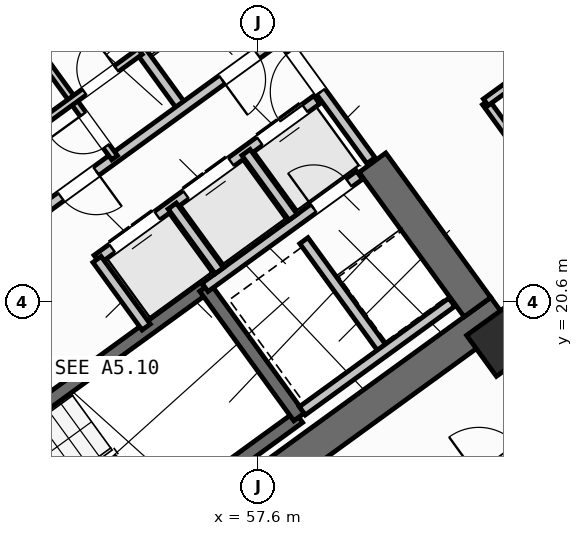
"""IFC4 building model, lengths in metres.
Left out: names, types, materials, properties, quantities, classifications, styles, units other than length and angle.
Written with IfcOpenShell. Run it as: python <this file> out.ifc"""

import sys

from ifc_helpers import new_model, si_unit, direction, frame, frame_2d, origin, origin_2d, place, context, subcontext, project, spatial, rectangle, hollow_rectangle, extrude, source, transform, mapped, element, fill, save


model = new_model("IFC4")
c1 = context("Model", 3, precision=1e-05, world=origin(), true_north=direction((0.0, 1.0)))
c2 = subcontext(c1, "Body", "Model", "MODEL_VIEW")
j1 = project(units=[si_unit("LENGTHUNIT", "METRE"), si_unit("PLANEANGLEUNIT", "RADIAN")], contexts=[c1])
p1 = place(None, origin())
s1 = spatial("IfcSite", under=j1, at=p1, CompositionType="ELEMENT")
p2 = place(p1, origin())
s2 = spatial("IfcBuilding", under=s1, at=p2, CompositionType="ELEMENT")
p3 = place(p2, frame((0.0, 0.0, 63.6)))
s3 = spatial("IfcBuildingStorey", under=s2, at=p3, CompositionType="ELEMENT", Elevation=63.6)
p4 = place(p3, frame((52.318, 13.11, 0.0), z_axis=(0.0, 0.0, 1.0), x_axis=(0.809019445368, 0.587781878776, 0.0)))
e1 = element("IfcWall", 1, at=p4, inside=s3, PredefinedType="SHEAR", context=c2, shape_type="SweptSolid", body=[
    extrude(rectangle(XDim=12.44, YDim=0.65, at=frame_2d((6.22, 0.0))), origin(), (0.0, 0.0, 1.0), 3.35),
])
p5 = place(p3, frame((44.325, 24.113, 0.0), z_axis=(0.0, 0.0, 1.0), x_axis=(0.809012664862, 0.58779121131, 0.0)))
e2 = element("IfcWall", 2, at=p5, inside=s3, PredefinedType="SHEAR", context=c2, shape_type="SweptSolid", body=[
    extrude(rectangle(XDim=12.44, YDim=0.65, at=frame_2d((6.22, 0.0))), origin(), (0.0, 0.0, 1.0), 3.35),
])
p6 = place(p3, frame((61.929, 20.494, 0.0), z_axis=(0.0, 0.0, 1.0), x_axis=(-0.58782982593, 0.808984607855, 0.0)))
e3 = element("IfcWall", 3, at=p6, inside=s3, PredefinedType="SHEAR", context=c2, shape_type="SweptSolid", body=[
    extrude(rectangle(XDim=3.525, YDim=0.65, at=frame_2d((1.762, 0.0))), origin(), (0.0, 0.0, 1.0), 3.35),
])
m1 = source(origin(), c2, "Body", "SweptSolid", [
    extrude(hollow_rectangle(XDim=1.0, YDim=1.0, WallThickness=0.04, at=origin_2d()), origin(), (0.0, 0.0, 1.0), 3.6),
])
p7 = place(p3, frame((62.414, 19.827, 0.0), z_axis=(0.0, 0.0, 1.0), x_axis=(0.809016994375, 0.587785252292, 0.0)))
e4 = element("IfcColumn", 4, at=p7, inside=s3, PredefinedType="COLUMN", context=c2, shape_type="MappedRepresentation", body=[
    mapped(m1, transform((0.0, 0.0, 0.0), scale=1.0)),
])
p8 = place(p3, frame((43.938, 25.192, 0.0), z_axis=(0.0, 0.0, 1.0), x_axis=(0.809016324578, 0.587786174187, 0.0)))
e5 = element("IfcWall", 5, at=p8, inside=s3, PredefinedType="STANDARD", context=c2, shape_type="SweptSolid", body=[
    extrude(rectangle(XDim=17.587, YDim=0.32, at=frame_2d((8.794, 0.0))), origin(), (0.0, 0.0, 1.0), 3.35),
])
p9 = place(p8, frame((14.914, 0.0, 0.0)))
e6 = element("IfcOpeningElement", 6, at=p9, cuts=e5, PredefinedType="OPENING", context=c2, shape_type="SweptSolid", body=[
    extrude(rectangle(XDim=1.05, YDim=2.15, at=frame_2d((0.525, 1.075))), frame((0.0, 0.17, 0.0), z_axis=(0.0, -1.0, 0.0), x_axis=(1.0, 0.0, 0.0)), (0.0, 0.0, 1.0), 0.34),
])
p10 = place(p8, frame((2.169, 0.0, 0.8)))
e7 = element("IfcOpeningElement", 7, at=p10, cuts=e5, PredefinedType="OPENING", context=c2, shape_type="SweptSolid", body=[
    extrude(rectangle(XDim=2.1, YDim=1.55, at=frame_2d((1.05, 0.775))), frame((0.0, 0.17, 0.0), z_axis=(0.0, -1.0, 0.0), x_axis=(1.0, 0.0, 0.0)), (0.0, 0.0, 1.0), 0.34),
])
p11 = place(p8, frame((7.319, 0.0, 0.8)))
e8 = element("IfcOpeningElement", 8, at=p11, cuts=e5, PredefinedType="OPENING", context=c2, shape_type="SweptSolid", body=[
    extrude(rectangle(XDim=2.1, YDim=1.55, at=frame_2d((1.05, 0.775))), frame((0.0, 0.17, 0.0), z_axis=(0.0, -1.0, 0.0), x_axis=(1.0, 0.0, 0.0)), (0.0, 0.0, 1.0), 0.34),
])
p12 = place(p3, frame((58.455, 35.484, 0.0), z_axis=(0.0, 0.0, 1.0), x_axis=(0.587783625747, -0.809018176127, 0.0)))
e9 = element("IfcWall", 9, at=p12, inside=s3, PredefinedType="STANDARD", context=c2, shape_type="SweptSolid", body=[
    extrude(rectangle(XDim=21.587, YDim=0.32, at=frame_2d((10.794, 0.0))), origin(), (0.0, 0.0, 1.0), 2.725),
])
p13 = place(p12, frame((2.994, 0.0, 0.8)))
e10 = element("IfcOpeningElement", 10, at=p13, cuts=e9, PredefinedType="OPENING", context=c2, shape_type="SweptSolid", body=[
    extrude(rectangle(XDim=2.1, YDim=1.55, at=frame_2d((1.05, 0.775))), frame((0.0, 0.17, 0.0), z_axis=(0.0, -1.0, 0.0), x_axis=(1.0, 0.0, 0.0)), (0.0, 0.0, 1.0), 0.34),
])
p14 = place(p12, frame((11.934, 0.0, 0.85)))
e11 = element("IfcOpeningElement", 11, at=p14, cuts=e9, PredefinedType="OPENING", context=c2, shape_type="SweptSolid", body=[
    extrude(rectangle(XDim=1.8, YDim=1.5, at=frame_2d((0.9, 0.75))), frame((0.0, 0.17, 0.0), z_axis=(0.0, -1.0, 0.0), x_axis=(1.0, 0.0, 0.0)), (0.0, 0.0, 1.0), 0.34),
])
p15 = place(p12, frame((18.535, 0.0, 0.85)))
e12 = element("IfcOpeningElement", 12, at=p15, cuts=e9, PredefinedType="OPENING", context=c2, shape_type="SweptSolid", body=[
    extrude(rectangle(XDim=1.5, YDim=1.5, at=frame_2d((0.75, 0.75))), frame((0.0, 0.17, 0.0), z_axis=(0.0, -1.0, 0.0), x_axis=(1.0, 0.0, 0.0)), (0.0, 0.0, 1.0), 0.34),
])
p16 = place(p3, frame((71.098, 17.731, 0.0), z_axis=(0.0, 0.0, 1.0), x_axis=(-0.809021120468, -0.587779573171, 0.0)))
e13 = element("IfcWall", 13, at=p16, inside=s3, PredefinedType="STANDARD", context=c2, shape_type="SweptSolid", body=[
    extrude(rectangle(XDim=17.588, YDim=0.32, at=frame_2d((8.794, 0.0))), origin(), (0.0, 0.0, 1.0), 3.35),
])
p17 = place(p16, frame((1.624, 0.0, 0.0)))
e14 = element("IfcOpeningElement", 14, at=p17, cuts=e13, PredefinedType="OPENING", context=c2, shape_type="SweptSolid", body=[
    extrude(rectangle(XDim=1.05, YDim=2.15, at=frame_2d((0.525, 1.075))), frame((0.0, 0.17, 0.0), z_axis=(0.0, -1.0, 0.0), x_axis=(1.0, 0.0, 0.0)), (0.0, 0.0, 1.0), 0.34),
])
p18 = place(p16, frame((4.104, 0.0, 1.0)))
e15 = element("IfcOpeningElement", 15, at=p18, cuts=e13, PredefinedType="OPENING", context=c2, shape_type="SweptSolid", body=[
    extrude(rectangle(XDim=0.9, YDim=1.25, at=frame_2d((0.45, 0.625))), frame((0.0, 0.17, 0.0), z_axis=(0.0, -1.0, 0.0), x_axis=(1.0, 0.0, 0.0)), (0.0, 0.0, 1.0), 0.34),
])
p19 = place(p16, frame((7.879, 0.0, 0.85)))
e16 = element("IfcOpeningElement", 16, at=p19, cuts=e13, PredefinedType="OPENING", context=c2, shape_type="SweptSolid", body=[
    extrude(rectangle(XDim=1.8, YDim=1.5, at=frame_2d((0.9, 0.75))), frame((0.0, 0.17, 0.0), z_axis=(0.0, -1.0, 0.0), x_axis=(1.0, 0.0, 0.0)), (0.0, 0.0, 1.0), 0.34),
])
p20 = place(p16, frame((12.849, 0.0, 0.85)))
e17 = element("IfcOpeningElement", 17, at=p20, cuts=e13, PredefinedType="OPENING", context=c2, shape_type="SweptSolid", body=[
    extrude(rectangle(XDim=1.8, YDim=1.5, at=frame_2d((0.9, 0.75))), frame((0.0, 0.17, 0.0), z_axis=(0.0, -1.0, 0.0), x_axis=(1.0, 0.0, 0.0)), (0.0, 0.0, 1.0), 0.34),
])
p21 = place(p3, frame((49.863, 23.44, 0.0), z_axis=(0.0, 0.0, 1.0), x_axis=(0.809003474932, 0.587803859759, 0.0)))
e18 = element("IfcWall", 18, at=p21, inside=s3, PredefinedType="SHEAR", context=c2, shape_type="SweptSolid", body=[
    extrude(rectangle(XDim=7.46, YDim=0.26, at=frame_2d((3.73, 0.0))), origin(), (0.0, 0.0, 1.0), 3.35),
])
p22 = place(p21, frame((0.36, 0.0, 0.0)))
e19 = element("IfcOpeningElement", 19, at=p22, cuts=e18, PredefinedType="OPENING", context=c2, shape_type="SweptSolid", body=[
    extrude(rectangle(XDim=0.86, YDim=2.05, at=frame_2d((0.43, 1.025))), frame((0.0, 0.14, 0.0), z_axis=(0.0, -1.0, 0.0), x_axis=(1.0, 0.0, 0.0)), (0.0, 0.0, 1.0), 0.28),
])
p23 = place(p3, frame((52.472, 14.013, 0.0), z_axis=(0.0, 0.0, 1.0), x_axis=(0.809028366311, 0.587769599847, 0.0)))
e20 = element("IfcWall", 20, at=p23, inside=s3, PredefinedType="SHEAR", context=c2, shape_type="SweptSolid", body=[
    extrude(rectangle(XDim=7.33, YDim=0.26, at=frame_2d((3.665, 0.0))), origin(), (0.0, 0.0, 1.0), 3.35),
])
p24 = place(p3, frame((50.615, 16.57, 0.0), z_axis=(0.0, 0.0, 1.0), x_axis=(0.809028366311, 0.587769599847, 0.0)))
e21 = element("IfcWall", 21, at=p24, inside=s3, PredefinedType="SHEAR", context=c2, shape_type="SweptSolid", body=[
    extrude(rectangle(XDim=7.33, YDim=0.26, at=frame_2d((3.665, 0.0))), origin(), (0.0, 0.0, 1.0), 3.35),
])
p25 = place(p24, frame((0.22, 0.0, 0.0)))
e22 = element("IfcOpeningElement", 22, at=p25, cuts=e21, PredefinedType="OPENING", context=c2, shape_type="SweptSolid", body=[
    extrude(rectangle(XDim=1.1, YDim=2.1, at=frame_2d((0.55, 1.05))), frame((0.0, 0.14, 0.0), z_axis=(0.0, -1.0, 0.0), x_axis=(1.0, 0.0, 0.0)), (0.0, 0.0, 1.0), 0.28),
])
p26 = place(p3, frame((58.41, 18.327, 0.0), z_axis=(0.0, 0.0, 1.0), x_axis=(-0.58776738483, 0.809029975545, 0.0)))
e23 = element("IfcWall", 23, at=p26, inside=s3, PredefinedType="SHEAR", context=c2, shape_type="SweptSolid", body=[
    extrude(rectangle(XDim=3.16, YDim=0.26, at=frame_2d((1.58, 0.0))), origin(), (0.0, 0.0, 1.0), 3.35),
])
p27 = place(p3, frame((56.553, 20.884, 0.0), z_axis=(0.0, 0.0, 1.0), x_axis=(0.809035789462, 0.587759382205, 0.0)))
e24 = element("IfcWall", 24, at=p27, inside=s3, PredefinedType="STANDARD", context=c2, shape_type="SweptSolid", body=[
    extrude(rectangle(XDim=3.768, YDim=0.2, at=frame_2d((1.884, 0.0))), origin(), (0.0, 0.0, 1.0), 3.34),
])
p28 = place(p27, frame((2.65, 0.0, 0.0)))
e25 = element("IfcOpeningElement", 25, at=p28, cuts=e24, PredefinedType="OPENING", context=c2, shape_type="SweptSolid", body=[
    extrude(rectangle(XDim=0.86, YDim=2.05, at=frame_2d((0.43, 1.025))), frame((0.0, 0.11, 0.0), z_axis=(0.0, -1.0, 0.0), x_axis=(1.0, 0.0, 0.0)), (0.0, 0.0, 1.0), 0.22),
])
p29 = place(p3, frame((54.421, 21.436, 0.0), z_axis=(0.0, 0.0, 1.0), x_axis=(0.809013710463, 0.587789772183, 0.0)))
e26 = element("IfcWall", 26, at=p29, inside=s3, PredefinedType="STANDARD", context=c2, shape_type="SweptSolid", body=[
    extrude(rectangle(XDim=5.36, YDim=0.2, at=frame_2d((2.68, 0.0))), origin(), (0.0, 0.0, 1.0), 3.34),
])
p30 = place(p29, frame((0.37, 0.0, 0.0)))
e27 = element("IfcOpeningElement", 27, at=p30, cuts=e26, PredefinedType="OPENING", context=c2, shape_type="SweptSolid", body=[
    extrude(rectangle(XDim=1.1, YDim=2.15, at=frame_2d((0.55, 1.075))), frame((0.0, 0.11, 0.0), z_axis=(0.0, -1.0, 0.0), x_axis=(1.0, 0.0, 0.0)), (0.0, 0.0, 1.0), 0.22),
])
p31 = place(p29, frame((2.17, 0.0, 0.0)))
e28 = element("IfcOpeningElement", 28, at=p31, cuts=e26, PredefinedType="OPENING", context=c2, shape_type="SweptSolid", body=[
    extrude(rectangle(XDim=1.1, YDim=2.15, at=frame_2d((0.55, 1.075))), frame((0.0, 0.11, 0.0), z_axis=(0.0, -1.0, 0.0), x_axis=(1.0, 0.0, 0.0)), (0.0, 0.0, 1.0), 0.22),
])
p32 = place(p29, frame((3.97, 0.0, 0.0)))
e29 = element("IfcOpeningElement", 29, at=p32, cuts=e26, PredefinedType="OPENING", context=c2, shape_type="SweptSolid", body=[
    extrude(rectangle(XDim=1.1, YDim=2.15, at=frame_2d((0.55, 1.075))), frame((0.0, 0.11, 0.0), z_axis=(0.0, -1.0, 0.0), x_axis=(1.0, 0.0, 0.0)), (0.0, 0.0, 1.0), 0.22),
])
p33 = place(p3, frame((55.391, 20.102, 0.0), z_axis=(0.0, 0.0, 1.0), x_axis=(-0.58778447739, 0.809017557374, 0.0)))
e30 = element("IfcWall", 30, at=p33, inside=s3, PredefinedType="STANDARD", context=c2, shape_type="SweptSolid", body=[
    extrude(rectangle(XDim=1.65, YDim=0.2, at=frame_2d((0.825, 0.0))), origin(), (0.0, 0.0, 1.0), 3.34),
])
p34 = place(p3, frame((56.834, 21.212, 0.0), z_axis=(0.0, 0.0, 1.0), x_axis=(-0.58776738483, 0.809029975545, 0.0)))
e31 = element("IfcWall", 31, at=p34, inside=s3, PredefinedType="STANDARD", context=c2, shape_type="SweptSolid", body=[
    extrude(rectangle(XDim=1.58, YDim=0.2, at=frame_2d((0.79, 0.0))), origin(), (0.0, 0.0, 1.0), 3.34),
])
p35 = place(p3, frame((58.29, 22.27, 0.0), z_axis=(0.0, 0.0, 1.0), x_axis=(-0.587840865826, 0.808976585857, 0.0)))
e32 = element("IfcWall", 32, at=p35, inside=s3, PredefinedType="STANDARD", context=c2, shape_type="SweptSolid", body=[
    extrude(rectangle(XDim=1.58, YDim=0.2, at=frame_2d((0.79, 0.0))), origin(), (0.0, 0.0, 1.0), 3.34),
])
p36 = place(p3, frame((60.067, 19.655, 0.0), z_axis=(0.0, 0.0, 1.0), x_axis=(-0.587800520745, 0.809005900975, 0.0)))
e33 = element("IfcWall", 33, at=p36, inside=s3, PredefinedType="STANDARD", context=c2, shape_type="SweptSolid", body=[
    extrude(rectangle(XDim=2.66, YDim=0.2, at=frame_2d((1.33, 0.0))), origin(), (0.0, 0.0, 1.0), 3.34),
])
p37 = place(p3, frame((58.472, 18.447, 0.0), z_axis=(0.0, 0.0, 1.0), x_axis=(0.809022487728, 0.587777691266, 0.0)))
e34 = element("IfcWall", 34, at=p37, inside=s3, PredefinedType="STANDARD", context=c2, shape_type="SweptSolid", body=[
    extrude(rectangle(XDim=3.648, YDim=0.2, at=frame_2d((1.824, 0.0))), origin(), (0.0, 0.0, 1.0), 3.34),
])
p38 = place(p3, frame((56.111, 24.419, 0.0), z_axis=(0.0, 0.0, 1.0), x_axis=(-0.58777848983, 0.809021907548, 0.0)))
e35 = element("IfcWall", 35, at=p38, inside=s3, PredefinedType="STANDARD", context=c2, shape_type="SweptSolid", body=[
    extrude(rectangle(XDim=2.88, YDim=0.2, at=frame_2d((1.44, 0.0))), origin(), (0.0, 0.0, 1.0), 3.34),
])
p39 = place(p3, frame((53.425, 22.468, 0.0), z_axis=(0.0, 0.0, 1.0), x_axis=(0.80902705128, 0.587771409902, 0.0)))
e36 = element("IfcWall", 36, at=p39, inside=s3, PredefinedType="STANDARD", context=c2, shape_type="SweptSolid", body=[
    extrude(rectangle(XDim=5.368, YDim=0.2, at=frame_2d((2.684, 0.0))), origin(), (0.0, 0.0, 1.0), 3.34),
])
p40 = place(p39, frame((4.28, 0.0, 0.0)))
e37 = element("IfcOpeningElement", 37, at=p40, cuts=e36, PredefinedType="OPENING", context=c2, shape_type="SweptSolid", body=[
    extrude(rectangle(XDim=0.86, YDim=2.05, at=frame_2d((0.43, 1.025))), frame((0.0, 0.11, 0.0), z_axis=(0.0, -1.0, 0.0), x_axis=(1.0, 0.0, 0.0)), (0.0, 0.0, 1.0), 0.22),
])
p41 = place(p39, frame((0.35, 0.0, 0.0)))
e38 = element("IfcOpeningElement", 38, at=p41, cuts=e36, PredefinedType="OPENING", context=c2, shape_type="SweptSolid", body=[
    extrude(rectangle(XDim=0.86, YDim=2.05, at=frame_2d((0.43, 1.025))), frame((0.0, 0.11, 0.0), z_axis=(0.0, -1.0, 0.0), x_axis=(1.0, 0.0, 0.0)), (0.0, 0.0, 1.0), 0.22),
])
p42 = place(p3, frame((54.768, 23.443, 0.0), z_axis=(0.0, 0.0, 1.0), x_axis=(-0.587736077749, 0.809052719489, 0.0)))
e39 = element("IfcWall", 39, at=p42, inside=s3, PredefinedType="PLUMBINGWALL", context=c2, shape_type="SweptSolid", body=[
    extrude(rectangle(XDim=1.4, YDim=0.14, at=frame_2d((0.7, 0.0))), origin(), (0.0, 0.0, 1.0), 3.34),
])
p43 = place(p42, frame((0.28, 0.0, 0.0)))
e40 = element("IfcOpeningElement", 40, at=p43, cuts=e39, PredefinedType="OPENING", context=c2, shape_type="SweptSolid", body=[
    extrude(rectangle(XDim=0.78, YDim=2.05, at=frame_2d((0.39, 1.025))), frame((0.0, 0.08, 0.0), z_axis=(0.0, -1.0, 0.0), x_axis=(1.0, 0.0, 0.0)), (0.0, 0.0, 1.0), 0.16),
])
p44 = place(p3, frame((53.945, 24.576, 0.0), z_axis=(0.0, 0.0, 1.0), x_axis=(-0.587897037186, 0.808935766095, 0.0)))
e41 = element("IfcWall", 41, at=p44, inside=s3, PredefinedType="PLUMBINGWALL", context=c2, shape_type="SweptSolid", body=[
    extrude(rectangle(XDim=1.48, YDim=0.14, at=frame_2d((0.74, 0.0))), origin(), (0.0, 0.0, 1.0), 3.34),
])
p45 = place(p3, frame((52.618, 23.612, 0.0), z_axis=(0.0, 0.0, 1.0), x_axis=(0.809009587469, 0.587795446889, 0.0)))
e42 = element("IfcWall", 42, at=p45, inside=s3, PredefinedType="PLUMBINGWALL", context=c2, shape_type="SweptSolid", body=[
    extrude(rectangle(XDim=3.28, YDim=0.14, at=frame_2d((1.64, 0.0))), origin(), (0.0, 0.0, 1.0), 3.34),
])
p46 = place(p45, frame((0.25, 0.0, 0.0)))
e43 = element("IfcOpeningElement", 43, at=p46, cuts=e42, PredefinedType="OPENING", context=c2, shape_type="SweptSolid", body=[
    extrude(rectangle(XDim=0.78, YDim=2.05, at=frame_2d((0.39, 1.025))), frame((0.0, 0.08, 0.0), z_axis=(0.0, -1.0, 0.0), x_axis=(1.0, 0.0, 0.0)), (0.0, 0.0, 1.0), 0.16),
])
p47 = place(p45, frame((1.92, 0.0, 0.0)))
e44 = element("IfcOpeningElement", 44, at=p47, cuts=e42, PredefinedType="OPENING", context=c2, shape_type="SweptSolid", body=[
    extrude(rectangle(XDim=0.78, YDim=2.05, at=frame_2d((0.39, 1.025))), frame((0.0, 0.08, 0.0), z_axis=(0.0, -1.0, 0.0), x_axis=(1.0, 0.0, 0.0)), (0.0, 0.0, 1.0), 0.16),
])
p48 = place(p3, frame((59.827, 23.386, 0.0), z_axis=(0.0, 0.0, 1.0), x_axis=(-0.587803840107, 0.809003489211, 0.0)))
e45 = element("IfcWall", 45, at=p48, inside=s3, PredefinedType="STANDARD", context=c2, shape_type="SweptSolid", body=[
    extrude(rectangle(XDim=2.96, YDim=0.2, at=frame_2d((1.48, 0.0))), origin(), (0.0, 0.0, 1.0), 3.34),
])
p49 = place(p48, frame((1.68, 0.0, 0.0)))
e46 = element("IfcOpeningElement", 46, at=p49, cuts=e45, PredefinedType="OPENING", context=c2, shape_type="SweptSolid", body=[
    extrude(rectangle(XDim=1.0, YDim=2.1, at=frame_2d((0.5, 1.05))), frame((0.0, 0.11, 0.0), z_axis=(0.0, -1.0, 0.0), x_axis=(1.0, 0.0, 0.0)), (0.0, 0.0, 1.0), 0.22),
])
p50 = place(p3, frame((68.353, 15.922, 0.0), z_axis=(0.0, 0.0, 1.0), x_axis=(-0.587783168305, 0.809018508476, 0.0)))
e47 = element("IfcWall", 47, at=p50, inside=s3, PredefinedType="PARTITIONING", context=c2, shape_type="SweptSolid", body=[
    extrude(rectangle(XDim=10.65, YDim=0.16, at=frame_2d((5.325, 0.0))), origin(), (0.0, 0.0, 1.0), 3.34),
])
p51 = place(p3, frame((62.093, 24.538, 0.0), z_axis=(0.0, 0.0, 1.0), x_axis=(0.809035546126, 0.58775971715, 0.0)))
e48 = element("IfcWall", 48, at=p51, inside=s3, PredefinedType="PARTITIONING", context=c2, shape_type="SweptSolid", body=[
    extrude(rectangle(XDim=3.63, YDim=0.16, at=frame_2d((1.815, 0.0))), origin(), (0.0, 0.0, 1.0), 3.34),
])
p52 = place(p51, frame((1.305, 0.0, 0.0)))
e49 = element("IfcOpeningElement", 49, at=p52, cuts=e48, PredefinedType="OPENING", context=c2, shape_type="SweptSolid", body=[
    extrude(rectangle(XDim=1.0, YDim=2.1, at=frame_2d((0.5, 1.05))), frame((0.0, 0.09, 0.0), z_axis=(0.0, -1.0, 0.0), x_axis=(1.0, 0.0, 0.0)), (0.0, 0.0, 1.0), 0.18),
])
p53 = place(p3, frame((53.705, 11.126, 0.0), z_axis=(0.0, 0.0, 1.0), x_axis=(0.809014504436, 0.587788679384, 0.0)))
e50 = element("IfcWall", 50, at=p53, inside=s3, PredefinedType="PARTITIONING", context=c2, shape_type="SweptSolid", body=[
    extrude(rectangle(XDim=14.67, YDim=0.16, at=frame_2d((7.335, 0.0))), origin(), (0.0, 0.0, 1.0), 3.34),
])
p54 = place(p53, frame((10.2, 0.0, 0.0)))
e51 = element("IfcOpeningElement", 51, at=p54, cuts=e50, PredefinedType="OPENING", context=c2, shape_type="SweptSolid", body=[
    extrude(rectangle(XDim=1.0, YDim=2.1, at=frame_2d((0.5, 1.05))), frame((0.0, 0.09, 0.0), z_axis=(0.0, -1.0, 0.0), x_axis=(1.0, 0.0, 0.0)), (0.0, 0.0, 1.0), 0.18),
])
p55 = place(p3, frame((56.249, 9.785, 0.0), z_axis=(0.0, 0.0, 1.0), x_axis=(0.809011747655, 0.587792473715, 0.0)))
e52 = element("IfcWall", 52, at=p55, inside=s3, PredefinedType="PLUMBINGWALL", context=c2, shape_type="SweptSolid", body=[
    extrude(rectangle(XDim=13.4, YDim=0.14, at=frame_2d((6.7, 0.0))), origin(), (0.0, 0.0, 1.0), 3.34),
])
p56 = place(p55, frame((8.94, 0.0, 0.0)))
e53 = element("IfcOpeningElement", 53, at=p56, cuts=e52, PredefinedType="OPENING", context=c2, shape_type="SweptSolid", body=[
    extrude(rectangle(XDim=0.92, YDim=2.08, at=frame_2d((0.46, 1.04))), frame((0.0, 0.08, 0.0), z_axis=(0.0, -1.0, 0.0), x_axis=(1.0, 0.0, 0.0)), (0.0, 0.0, 1.0), 0.16),
])
m2 = source(origin(), c2, "Body", "SweptSolid", [
    extrude(rectangle(XDim=1.1, YDim=2.15, at=frame_2d((0.55, 1.075))), frame((0.0, 0.025, 0.0), z_axis=(0.0, -1.0, 0.0), x_axis=(1.0, 0.0, 0.0)), (0.0, 0.0, 1.0), 0.05),
])
p57 = place(p30, origin())
e54 = element("IfcDoor", 54, at=p57, inside=s3, OperationType="DOUBLE_DOOR_SLIDING", PredefinedType="DOOR", context=c2, shape_type="MappedRepresentation", body=[
    mapped(m2, transform((0.0, 0.0, 0.0), scale=1.0)),
])
fill(e27, e54)
p58 = place(p31, origin())
e55 = element("IfcDoor", 55, at=p58, inside=s3, OperationType="DOUBLE_DOOR_SLIDING", PredefinedType="DOOR", context=c2, shape_type="MappedRepresentation", body=[
    mapped(m2, transform((0.0, 0.0, 0.0), scale=1.0)),
])
fill(e28, e55)
p59 = place(p32, origin())
e56 = element("IfcDoor", 56, at=p59, inside=s3, OperationType="DOUBLE_DOOR_SLIDING", PredefinedType="DOOR", context=c2, shape_type="MappedRepresentation", body=[
    mapped(m2, transform((0.0, 0.0, 0.0), scale=1.0)),
])
fill(e29, e56)
m3 = source(origin(), c2, "Body", "SweptSolid", [
    extrude(rectangle(XDim=0.86, YDim=2.05, at=frame_2d((0.43, 1.025))), frame((0.0, 0.025, 0.0), z_axis=(0.0, -1.0, 0.0), x_axis=(1.0, 0.0, 0.0)), (0.0, 0.0, 1.0), 0.05),
])
p60 = place(p28, origin())
e57 = element("IfcDoor", 57, at=p60, inside=s3, OperationType="SINGLE_SWING_LEFT", PredefinedType="DOOR", context=c2, shape_type="MappedRepresentation", body=[
    mapped(m3, transform((0.0, 0.0, 0.0), scale=1.0)),
])
fill(e25, e57)
p61 = place(p40, frame((0.86, 0.0, 0.0), z_axis=(0.0, 0.0, 1.0), x_axis=(-1.0, 0.0, 0.0)))
e58 = element("IfcDoor", 58, at=p61, inside=s3, OperationType="SINGLE_SWING_RIGHT", PredefinedType="DOOR", context=c2, shape_type="MappedRepresentation", body=[
    mapped(m3, transform((0.0, 0.0, 0.0), scale=1.0)),
])
fill(e37, e58)
p62 = place(p41, frame((0.86, 0.0, 0.0), z_axis=(0.0, 0.0, 1.0), x_axis=(-1.0, 0.0, 0.0)))
e59 = element("IfcDoor", 59, at=p62, inside=s3, OperationType="SINGLE_SWING_LEFT", PredefinedType="DOOR", context=c2, shape_type="MappedRepresentation", body=[
    mapped(m3, transform((0.0, 0.0, 0.0), scale=1.0)),
])
fill(e38, e59)
m4 = source(origin(), c2, "Body", "SweptSolid", [
    extrude(rectangle(XDim=0.78, YDim=2.05, at=frame_2d((0.39, 1.025))), frame((0.0, 0.025, 0.0), z_axis=(0.0, -1.0, 0.0), x_axis=(1.0, 0.0, 0.0)), (0.0, 0.0, 1.0), 0.05),
])
p63 = place(p43, origin())
e60 = element("IfcDoor", 60, at=p63, inside=s3, OperationType="SINGLE_SWING_RIGHT", PredefinedType="DOOR", context=c2, shape_type="MappedRepresentation", body=[
    mapped(m4, transform((0.0, 0.0, 0.0), scale=1.0)),
])
fill(e40, e60)
p64 = place(p47, origin())
e61 = element("IfcDoor", 61, at=p64, inside=s3, OperationType="SINGLE_SWING_RIGHT", PredefinedType="DOOR", context=c2, shape_type="MappedRepresentation", body=[
    mapped(m4, transform((0.0, 0.0, 0.0), scale=1.0)),
])
fill(e44, e61)
m5 = source(origin(), c2, "Body", "SweptSolid", [
    extrude(rectangle(XDim=1.0, YDim=2.1, at=frame_2d((0.5, 1.05))), frame((0.0, 0.025, 0.0), z_axis=(0.0, -1.0, 0.0), x_axis=(1.0, 0.0, 0.0)), (0.0, 0.0, 1.0), 0.05),
])
p65 = place(p49, origin())
e62 = element("IfcDoor", 62, at=p65, inside=s3, OperationType="SINGLE_SWING_LEFT", PredefinedType="DOOR", context=c2, shape_type="MappedRepresentation", body=[
    mapped(m5, transform((0.0, 0.0, 0.0), scale=1.0)),
])
fill(e46, e62)
p66 = place(p54, origin())
e63 = element("IfcDoor", 63, at=p66, inside=s3, OperationType="SINGLE_SWING_LEFT", PredefinedType="DOOR", context=c2, shape_type="MappedRepresentation", body=[
    mapped(m5, transform((0.0, 0.0, 0.0), scale=1.0)),
])
fill(e51, e63)
save(model, sys.argv[1])
